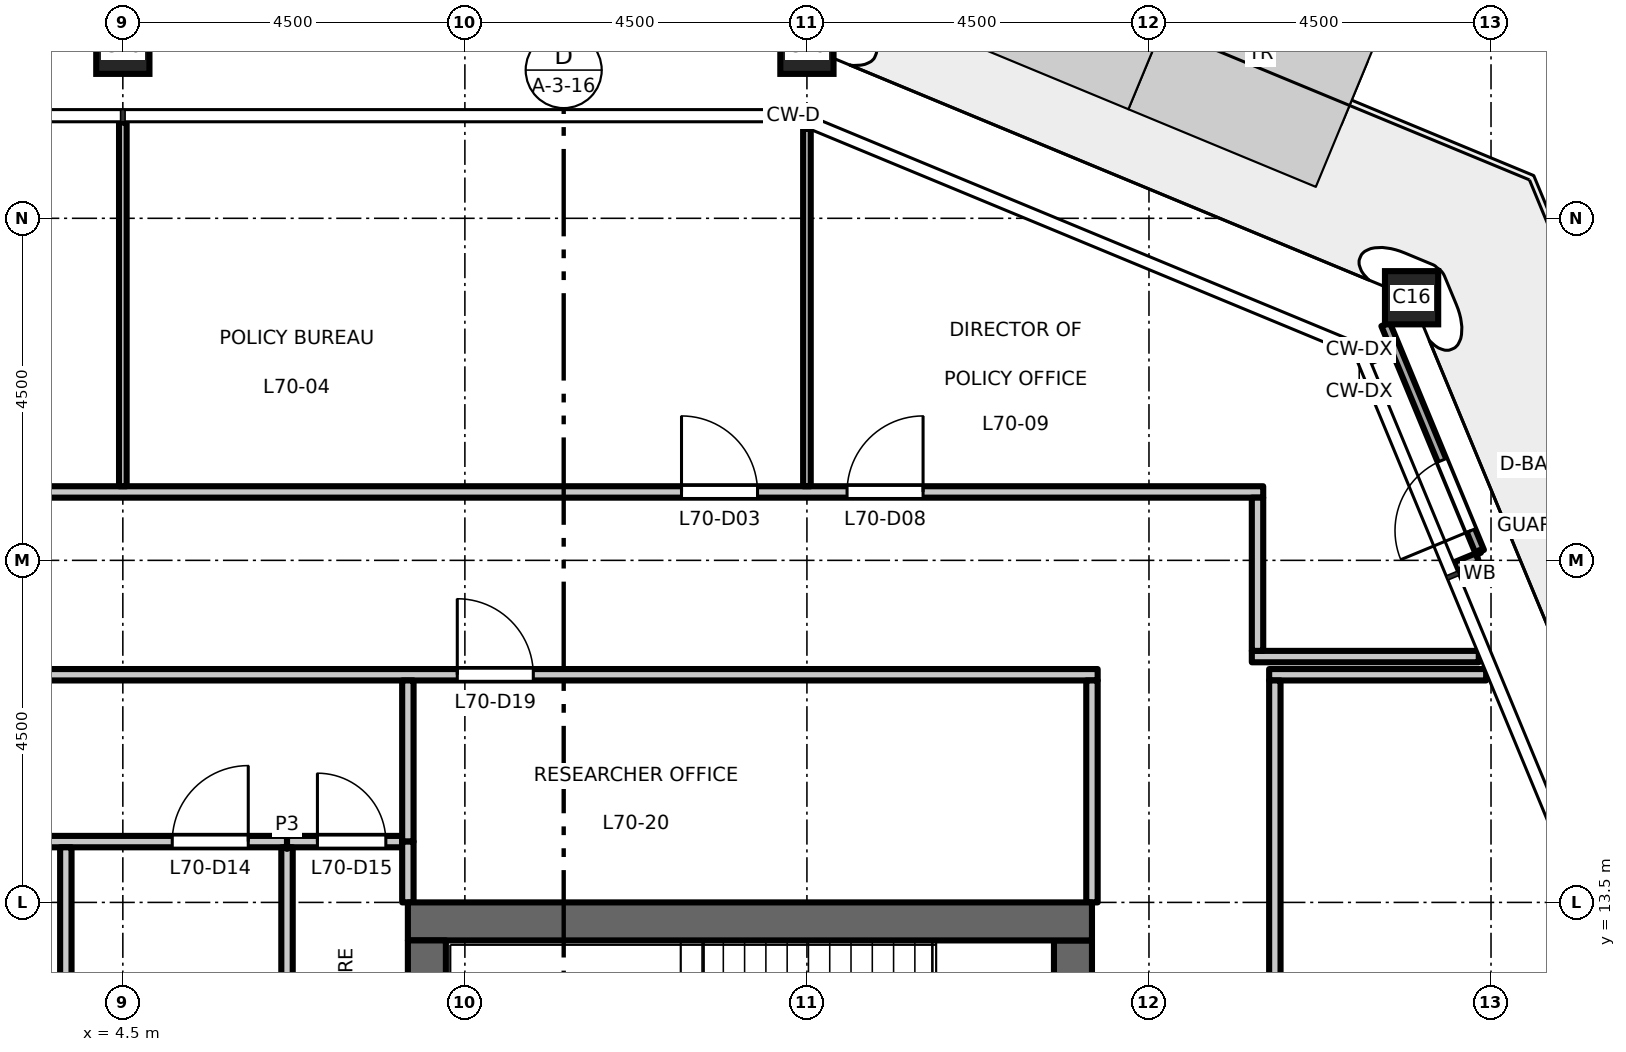
"""IFC4 building model, lengths in metres.
Left out: names, types, materials, properties, quantities, classifications, styles, units other than length and angle.
Written with IfcOpenShell. Run it as: python <this file> out.ifc"""

import sys

from ifc_helpers import new_model, si_unit, direction, frame, frame_2d, origin, origin_2d, place, context, subcontext, project, spatial, rectangle, hollow_rectangle, extrude, element, fill, save


model = new_model("IFC4")
c1 = context("Model", 3, precision=1e-05, world=origin(), true_north=direction((0.0, 1.0)))
c2 = subcontext(c1, "Body", "Model", "MODEL_VIEW")
j1 = project(units=[si_unit("LENGTHUNIT", "METRE"), si_unit("PLANEANGLEUNIT", "RADIAN")], contexts=[c1])
p1 = place(None, origin())
s1 = spatial("IfcSite", under=j1, at=p1, CompositionType="ELEMENT")
p2 = place(p1, origin())
s2 = spatial("IfcBuilding", under=s1, at=p2, CompositionType="ELEMENT")
p3 = place(p2, frame((0.0, 0.0, 325.7)))
s3 = spatial("IfcBuildingStorey", under=s2, at=p3, CompositionType="ELEMENT", Elevation=325.7)
for number, where, z_axis, x_axis in (
    (1, (21.455, 21.455, 0.0), (0.0, 0.0, 1.0), (1.0, 0.0, 0.0)),
    (2, (13.5, 24.75, 0.0), (0.0, 0.0, 1.0), (1.0, 0.0, 0.0)),
    (3, (4.5, 24.75, 0.0), (0.0, 0.0, 1.0), (1.0, 0.0, 0.0)),
):
    element("IfcColumn", number, at=place(p3, frame(where, z_axis=z_axis, x_axis=x_axis)), inside=s3, PredefinedType="COLUMN", context=c2, shape_type="SweptSolid", body=[
        extrude(hollow_rectangle(XDim=0.7, YDim=0.7, WallThickness=0.036, at=origin_2d()), origin(), (0.0, 0.0, 1.0), 4.5),
    ])
p4 = place(p3, frame((17.0, -13.0, 0.0), z_axis=(0.0, 0.0, 1.0), x_axis=(0.0, 1.0, 0.0)))
e4 = element("IfcWall", 4, at=p4, inside=s3, PredefinedType="SHEAR", context=c2, shape_type="SweptSolid", body=[
    extrude(rectangle(XDim=26.0, YDim=0.5, at=frame_2d((13.0, 0.0))), origin(), (0.0, 0.0, 1.0), 4.35),
])
p5 = place(p4, frame((16.825, 0.0, 0.0)))
e5 = element("IfcOpeningElement", 5, at=p5, cuts=e4, PredefinedType="OPENING", context=c2, shape_type="SweptSolid", body=[
    extrude(rectangle(XDim=1.8, YDim=2.1, at=frame_2d((0.9, 1.05))), frame((0.0, 0.26, 0.0), z_axis=(0.0, -1.0, 0.0), x_axis=(1.0, 0.0, 0.0)), (0.0, 0.0, 1.0), 0.52),
])
p6 = place(p4, frame((7.375, 0.0, 0.0)))
e6 = element("IfcOpeningElement", 6, at=p6, cuts=e4, PredefinedType="OPENING", context=c2, shape_type="SweptSolid", body=[
    extrude(rectangle(XDim=1.8, YDim=2.1, at=frame_2d((0.9, 1.05))), frame((0.0, 0.26, 0.0), z_axis=(0.0, -1.0, 0.0), x_axis=(1.0, 0.0, 0.0)), (0.0, 0.0, 1.0), 0.52),
])
p7 = place(p3, frame((8.25, 13.25, 0.0), z_axis=(0.0, 0.0, 1.0), x_axis=(1.0, 0.0, 0.0)))
e7 = element("IfcWall", 7, at=p7, inside=s3, PredefinedType="SHEAR", context=c2, shape_type="SweptSolid", body=[
    extrude(rectangle(XDim=9.0, YDim=0.5, at=frame_2d((4.5, 0.0))), origin(), (0.0, 0.0, 1.0), 4.35),
])
p8 = place(p3, frame((8.5, -13.0, 0.0), z_axis=(0.0, 0.0, 1.0), x_axis=(0.0, 1.0, 0.0)))
e8 = element("IfcWall", 8, at=p8, inside=s3, PredefinedType="SHEAR", context=c2, shape_type="SweptSolid", body=[
    extrude(rectangle(XDim=26.0, YDim=0.5, at=frame_2d((13.0, 0.0))), origin(), (0.0, 0.0, 1.0), 4.35),
])
p9 = place(p3, frame((22.033, 17.917, 0.0), z_axis=(0.0, 0.0, 1.0), x_axis=(0.923844027884, 0.382769136873, 0.0)))
e9 = element("IfcWall", 9, at=p9, inside=s3, PredefinedType="STANDARD", context=c2, shape_type="SweptSolid", body=[
    extrude(rectangle(XDim=0.31, YDim=0.12, at=frame_2d((0.155, 0.0))), origin(), (0.0, 0.0, 1.0), 4.35),
])
p10 = place(p3, frame((20.896, 20.66, 0.0), z_axis=(0.0, 0.0, 1.0), x_axis=(0.923959293734, 0.382490814953, 0.0)))
e10 = element("IfcWall", 10, at=p10, inside=s3, PredefinedType="STANDARD", context=c2, shape_type="SweptSolid", body=[
    extrude(rectangle(XDim=0.31, YDim=0.12, at=frame_2d((0.155, 0.0))), origin(), (0.0, 0.0, 1.0), 4.35),
])
p11 = place(p3, frame((22.352, 18.115, 0.0), z_axis=(0.0, 0.0, 1.0), x_axis=(-0.382702621907, 0.923871583709, 0.0)))
e11 = element("IfcWall", 11, at=p11, inside=s3, PredefinedType="STANDARD", context=c2, shape_type="SweptSolid", body=[
    extrude(rectangle(XDim=3.237, YDim=0.12, at=frame_2d((1.618, 0.0))), origin(), (0.0, 0.0, 1.0), 4.35),
])
p12 = place(p11, frame((0.3, 0.0, 0.0)))
e12 = element("IfcOpeningElement", 12, at=p12, cuts=e11, PredefinedType="OPENING", context=c2, shape_type="SweptSolid", body=[
    extrude(rectangle(XDim=1.0, YDim=2.4, at=frame_2d((0.5, 1.2))), frame((0.0, 0.07, 0.0), z_axis=(0.0, -1.0, 0.0), x_axis=(1.0, 0.0, 0.0)), (0.0, 0.0, 1.0), 0.14),
])
p13 = place(p3, frame((-8.175, 14.3, 0.0), z_axis=(0.0, 0.0, 1.0), x_axis=(1.0, 0.0, 0.0)))
e13 = element("IfcWall", 13, at=p13, inside=s3, PredefinedType="PARTITIONING", context=c2, shape_type="SweptSolid", body=[
    extrude(rectangle(XDim=14.835, YDim=0.15, at=frame_2d((7.417, 0.0))), origin(), (0.0, 0.0, 1.0), 4.35),
])
p14 = place(p13, frame((4.325, 0.0, 0.0)))
e14 = element("IfcOpeningElement", 14, at=p14, cuts=e13, PredefinedType="OPENING", context=c2, shape_type="SweptSolid", body=[
    extrude(rectangle(XDim=1.0, YDim=2.1, at=frame_2d((0.5, 1.05))), frame((0.0, 0.085, 0.0), z_axis=(0.0, -1.0, 0.0), x_axis=(1.0, 0.0, 0.0)), (0.0, 0.0, 1.0), 0.17),
])
p15 = place(p13, frame((6.575, 0.0, 0.0)))
e15 = element("IfcOpeningElement", 15, at=p15, cuts=e13, PredefinedType="OPENING", context=c2, shape_type="SweptSolid", body=[
    extrude(rectangle(XDim=1.0, YDim=2.1, at=frame_2d((0.5, 1.05))), frame((0.0, 0.085, 0.0), z_axis=(0.0, -1.0, 0.0), x_axis=(1.0, 0.0, 0.0)), (0.0, 0.0, 1.0), 0.17),
])
p16 = place(p13, frame((13.325, 0.0, 0.0)))
e16 = element("IfcOpeningElement", 16, at=p16, cuts=e13, PredefinedType="OPENING", context=c2, shape_type="SweptSolid", body=[
    extrude(rectangle(XDim=1.0, YDim=2.1, at=frame_2d((0.5, 1.05))), frame((0.0, 0.085, 0.0), z_axis=(0.0, -1.0, 0.0), x_axis=(1.0, 0.0, 0.0)), (0.0, 0.0, 1.0), 0.17),
])
p17 = place(p3, frame((6.66, 14.3, 0.0), z_axis=(0.0, 0.0, 1.0), x_axis=(1.0, 0.0, 0.0)))
e17 = element("IfcWall", 17, at=p17, inside=s3, PredefinedType="PARTITIONING", context=c2, shape_type="SweptSolid", body=[
    extrude(rectangle(XDim=1.515, YDim=0.15, at=frame_2d((0.758, 0.0))), origin(), (0.0, 0.0, 1.0), 4.35),
])
p18 = place(p17, frame((0.4, 0.0, 0.0)))
e18 = element("IfcOpeningElement", 18, at=p18, cuts=e17, PredefinedType="OPENING", context=c2, shape_type="SweptSolid", body=[
    extrude(rectangle(XDim=0.9, YDim=2.1, at=frame_2d((0.45, 1.05))), frame((0.0, 0.085, 0.0), z_axis=(0.0, -1.0, 0.0), x_axis=(1.0, 0.0, 0.0)), (0.0, 0.0, 1.0), 0.17),
])
p19 = place(p3, frame((-17.325, 16.495, 0.0), z_axis=(0.0, 0.0, 1.0), x_axis=(1.0, 0.0, 0.0)))
e19 = element("IfcWall", 19, at=p19, inside=s3, PredefinedType="PARTITIONING", context=c2, shape_type="SweptSolid", body=[
    extrude(rectangle(XDim=34.65, YDim=0.15, at=frame_2d((17.325, 0.0))), origin(), (0.0, 0.0, 1.0), 4.35),
])
p20 = place(p19, frame((9.725, 0.0, 0.0)))
e20 = element("IfcOpeningElement", 20, at=p20, cuts=e19, PredefinedType="OPENING", context=c2, shape_type="SweptSolid", body=[
    extrude(rectangle(XDim=1.0, YDim=2.1, at=frame_2d((0.5, 1.05))), frame((0.0, 0.085, 0.0), z_axis=(0.0, -1.0, 0.0), x_axis=(1.0, 0.0, 0.0)), (0.0, 0.0, 1.0), 0.17),
])
p21 = place(p19, frame((7.475, 0.0, 0.0)))
e21 = element("IfcOpeningElement", 21, at=p21, cuts=e19, PredefinedType="OPENING", context=c2, shape_type="SweptSolid", body=[
    extrude(rectangle(XDim=1.0, YDim=2.1, at=frame_2d((0.5, 1.05))), frame((0.0, 0.085, 0.0), z_axis=(0.0, -1.0, 0.0), x_axis=(1.0, 0.0, 0.0)), (0.0, 0.0, 1.0), 0.17),
])
p22 = place(p19, frame((26.225, 0.0, 0.0)))
e22 = element("IfcOpeningElement", 22, at=p22, cuts=e19, PredefinedType="OPENING", context=c2, shape_type="SweptSolid", body=[
    extrude(rectangle(XDim=1.0, YDim=2.1, at=frame_2d((0.5, 1.05))), frame((0.0, 0.085, 0.0), z_axis=(0.0, -1.0, 0.0), x_axis=(1.0, 0.0, 0.0)), (0.0, 0.0, 1.0), 0.17),
])
p23 = place(p3, frame((19.581, 16.495, 0.0), z_axis=(0.0, 0.0, 1.0), x_axis=(1.0, 0.0, 0.0)))
e23 = element("IfcWall", 23, at=p23, inside=s3, PredefinedType="PARTITIONING", context=c2, shape_type="SweptSolid", body=[
    extrude(rectangle(XDim=2.855, YDim=0.15, at=frame_2d((1.427, 0.0))), origin(), (0.0, 0.0, 1.0), 4.35),
])
p24 = place(p3, frame((19.353, 16.734, 0.0), z_axis=(0.0, 0.0, 1.0), x_axis=(1.0, 0.0, 0.0)))
e24 = element("IfcWall", 24, at=p24, inside=s3, PredefinedType="PARTITIONING", context=c2, shape_type="SweptSolid", body=[
    extrude(rectangle(XDim=2.986, YDim=0.15, at=frame_2d((1.493, 0.0))), origin(), (0.0, 0.0, 1.0), 4.35),
])
p25 = place(p3, frame((-21.441, 18.9, 0.0), z_axis=(0.0, 0.0, 1.0), x_axis=(1.0, 0.0, 0.0)))
e25 = element("IfcWall", 25, at=p25, inside=s3, PredefinedType="PARTITIONING", context=c2, shape_type="SweptSolid", body=[
    extrude(rectangle(XDim=40.944, YDim=0.15, at=frame_2d((20.472, 0.0))), origin(), (0.0, 0.0, 1.0), 4.35),
])
p26 = place(p25, frame((15.291, 0.0, 0.0)))
e26 = element("IfcOpeningElement", 26, at=p26, cuts=e25, PredefinedType="OPENING", context=c2, shape_type="SweptSolid", body=[
    extrude(rectangle(XDim=1.0, YDim=2.1, at=frame_2d((0.5, 1.05))), frame((0.0, 0.085, 0.0), z_axis=(0.0, -1.0, 0.0), x_axis=(1.0, 0.0, 0.0)), (0.0, 0.0, 1.0), 0.17),
])
p27 = place(p25, frame((17.541, 0.0, 0.0)))
e27 = element("IfcOpeningElement", 27, at=p27, cuts=e25, PredefinedType="OPENING", context=c2, shape_type="SweptSolid", body=[
    extrude(rectangle(XDim=1.0, YDim=2.1, at=frame_2d((0.5, 1.05))), frame((0.0, 0.085, 0.0), z_axis=(0.0, -1.0, 0.0), x_axis=(1.0, 0.0, 0.0)), (0.0, 0.0, 1.0), 0.17),
])
p28 = place(p25, frame((33.291, 0.0, 0.0)))
e28 = element("IfcOpeningElement", 28, at=p28, cuts=e25, PredefinedType="OPENING", context=c2, shape_type="SweptSolid", body=[
    extrude(rectangle(XDim=1.0, YDim=2.1, at=frame_2d((0.5, 1.05))), frame((0.0, 0.085, 0.0), z_axis=(0.0, -1.0, 0.0), x_axis=(1.0, 0.0, 0.0)), (0.0, 0.0, 1.0), 0.17),
])
p29 = place(p25, frame((6.291, 0.0, 0.0)))
e29 = element("IfcOpeningElement", 29, at=p29, cuts=e25, PredefinedType="OPENING", context=c2, shape_type="SweptSolid", body=[
    extrude(rectangle(XDim=1.0, YDim=2.1, at=frame_2d((0.5, 1.05))), frame((0.0, 0.085, 0.0), z_axis=(0.0, -1.0, 0.0), x_axis=(1.0, 0.0, 0.0)), (0.0, 0.0, 1.0), 0.17),
])
p30 = place(p25, frame((35.469, 0.0, 0.0)))
e30 = element("IfcOpeningElement", 30, at=p30, cuts=e25, PredefinedType="OPENING", context=c2, shape_type="SweptSolid", body=[
    extrude(rectangle(XDim=1.0, YDim=2.1, at=frame_2d((0.5, 1.05))), frame((0.0, 0.085, 0.0), z_axis=(0.0, -1.0, 0.0), x_axis=(1.0, 0.0, 0.0)), (0.0, 0.0, 1.0), 0.17),
])
p31 = place(p3, frame((3.75, 8.37, 0.0), z_axis=(0.0, 0.0, 1.0), x_axis=(0.0, 1.0, 0.0)))
e31 = element("IfcWall", 31, at=p31, inside=s3, PredefinedType="PARTITIONING", context=c2, shape_type="SweptSolid", body=[
    extrude(rectangle(XDim=5.855, YDim=0.15, at=frame_2d((2.927, 0.0))), origin(), (0.0, 0.0, 1.0), 4.35),
])
p32 = place(p3, frame((4.5, 18.975, 0.0), z_axis=(0.0, 0.0, 1.0), x_axis=(0.0, 1.0, 0.0)))
e32 = element("IfcWall", 32, at=p32, inside=s3, PredefinedType="PARTITIONING", context=c2, shape_type="SweptSolid", body=[
    extrude(rectangle(XDim=4.785, YDim=0.1, at=frame_2d((2.393, 0.0))), origin(), (0.0, 0.0, 1.0), 3.65),
])
p33 = place(p3, frame((6.66, 8.127, 0.0), z_axis=(0.0, 0.0, 1.0), x_axis=(0.0, 1.0, 0.0)))
e33 = element("IfcWall", 33, at=p33, inside=s3, PredefinedType="PARTITIONING", context=c2, shape_type="SweptSolid", body=[
    extrude(rectangle(XDim=6.098, YDim=0.15, at=frame_2d((3.049, 0.0))), origin(), (0.0, 0.0, 1.0), 4.35),
])
p34 = place(p3, frame((8.25, 14.3, 0.0), z_axis=(0.0, 0.0, 1.0), x_axis=(0.0, 1.0, 0.0)))
e34 = element("IfcWall", 34, at=p34, inside=s3, PredefinedType="PARTITIONING", context=c2, shape_type="SweptSolid", body=[
    extrude(rectangle(XDim=2.12, YDim=0.15, at=frame_2d((1.06, 0.0))), origin(), (0.0, 0.0, 1.0), 4.35),
])
p35 = place(p3, frame((8.25, 13.5, 0.0), z_axis=(0.0, 0.0, 1.0), x_axis=(0.0, 1.0, 0.0)))
e35 = element("IfcWall", 35, at=p35, inside=s3, PredefinedType="PARTITIONING", context=c2, shape_type="SweptSolid", body=[
    extrude(rectangle(XDim=0.8, YDim=0.15, at=frame_2d((0.4, 0.0))), origin(), (0.0, 0.0, 1.0), 4.35),
])
p36 = place(p3, frame((13.5, 18.975, 0.0), z_axis=(0.0, 0.0, 1.0), x_axis=(0.0, 1.0, 0.0)))
e36 = element("IfcWall", 36, at=p36, inside=s3, PredefinedType="PARTITIONING", context=c2, shape_type="SweptSolid", body=[
    extrude(rectangle(XDim=4.703, YDim=0.1, at=frame_2d((2.352, 0.0))), origin(), (0.0, 0.0, 1.0), 3.75),
])
p37 = place(p3, frame((17.25, 13.5, 0.0), z_axis=(0.0, 0.0, 1.0), x_axis=(0.0, 1.0, 0.0)))
e37 = element("IfcWall", 37, at=p37, inside=s3, PredefinedType="PARTITIONING", context=c2, shape_type="SweptSolid", body=[
    extrude(rectangle(XDim=2.92, YDim=0.15, at=frame_2d((1.46, 0.0))), origin(), (0.0, 0.0, 1.0), 4.35),
])
p38 = place(p3, frame((19.428, 16.809, 0.0), z_axis=(0.0, 0.0, 1.0), x_axis=(0.0, 1.0, 0.0)))
e38 = element("IfcWall", 38, at=p38, inside=s3, PredefinedType="PARTITIONING", context=c2, shape_type="SweptSolid", body=[
    extrude(rectangle(XDim=2.016, YDim=0.15, at=frame_2d((1.008, 0.0))), origin(), (0.0, 0.0, 1.0), 4.35),
])
p39 = place(p3, frame((19.656, -16.425, 0.0), z_axis=(0.0, 0.0, 1.0), x_axis=(0.0, 1.0, 0.0)))
e39 = element("IfcWall", 39, at=p39, inside=s3, PredefinedType="PARTITIONING", context=c2, shape_type="SweptSolid", body=[
    extrude(rectangle(XDim=32.845, YDim=0.15, at=frame_2d((16.422, 0.0))), origin(), (0.0, 0.0, 1.0), 4.35),
])
p40 = place(p39, frame((0.575, 0.0, 0.0)))
e40 = element("IfcOpeningElement", 40, at=p40, cuts=e39, PredefinedType="OPENING", context=c2, shape_type="SweptSolid", body=[
    extrude(rectangle(XDim=1.0, YDim=2.1, at=frame_2d((0.5, 1.05))), frame((0.0, 0.085, 0.0), z_axis=(0.0, -1.0, 0.0), x_axis=(1.0, 0.0, 0.0)), (0.0, 0.0, 1.0), 0.17),
])
p41 = place(p12, origin())
e41 = element("IfcDoor", 41, at=p41, inside=s3, OperationType="SINGLE_SWING_LEFT", PredefinedType="DOOR", context=c2, shape_type="SweptSolid", body=[
    extrude(rectangle(XDim=1.0, YDim=2.4, at=frame_2d((0.5, 1.2))), frame((0.0, 0.025, 0.0), z_axis=(0.0, -1.0, 0.0), x_axis=(1.0, 0.0, 0.0)), (0.0, 0.0, 1.0), 0.05),
])
fill(e12, e41)
p42 = place(p28, origin())
e42 = element("IfcDoor", 42, at=p42, inside=s3, OperationType="SINGLE_SWING_LEFT", PredefinedType="DOOR", context=c2, shape_type="SweptSolid", body=[
    extrude(rectangle(XDim=1.0, YDim=2.1, at=frame_2d((0.5, 1.05))), frame((0.0, 0.025, 0.0), z_axis=(0.0, -1.0, 0.0), x_axis=(1.0, 0.0, 0.0)), (0.0, 0.0, 1.0), 0.05),
])
fill(e28, e42)
p43 = place(p30, origin())
e43 = element("IfcDoor", 43, at=p43, inside=s3, OperationType="SINGLE_SWING_RIGHT", PredefinedType="DOOR", context=c2, shape_type="SweptSolid", body=[
    extrude(rectangle(XDim=1.0, YDim=2.1, at=frame_2d((0.5, 1.05))), frame((0.0, 0.025, 0.0), z_axis=(0.0, -1.0, 0.0), x_axis=(1.0, 0.0, 0.0)), (0.0, 0.0, 1.0), 0.05),
])
fill(e30, e43)
p44 = place(p16, origin())
e44 = element("IfcDoor", 44, at=p44, inside=s3, OperationType="SINGLE_SWING_RIGHT", PredefinedType="DOOR", context=c2, shape_type="SweptSolid", body=[
    extrude(rectangle(XDim=1.0, YDim=2.1, at=frame_2d((0.5, 1.05))), frame((0.0, 0.025, 0.0), z_axis=(0.0, -1.0, 0.0), x_axis=(1.0, 0.0, 0.0)), (0.0, 0.0, 1.0), 0.05),
])
fill(e16, e44)
p45 = place(p18, origin())
e45 = element("IfcDoor", 45, at=p45, inside=s3, OperationType="SINGLE_SWING_LEFT", PredefinedType="DOOR", context=c2, shape_type="SweptSolid", body=[
    extrude(rectangle(XDim=0.9, YDim=2.1, at=frame_2d((0.45, 1.05))), frame((0.0, 0.025, 0.0), z_axis=(0.0, -1.0, 0.0), x_axis=(1.0, 0.0, 0.0)), (0.0, 0.0, 1.0), 0.05),
])
fill(e18, e45)
p46 = place(p22, origin())
e46 = element("IfcDoor", 46, at=p46, inside=s3, OperationType="SINGLE_SWING_LEFT", PredefinedType="DOOR", context=c2, shape_type="SweptSolid", body=[
    extrude(rectangle(XDim=1.0, YDim=2.1, at=frame_2d((0.5, 1.05))), frame((0.0, 0.025, 0.0), z_axis=(0.0, -1.0, 0.0), x_axis=(1.0, 0.0, 0.0)), (0.0, 0.0, 1.0), 0.05),
])
fill(e22, e46)
save(model, sys.argv[1])
